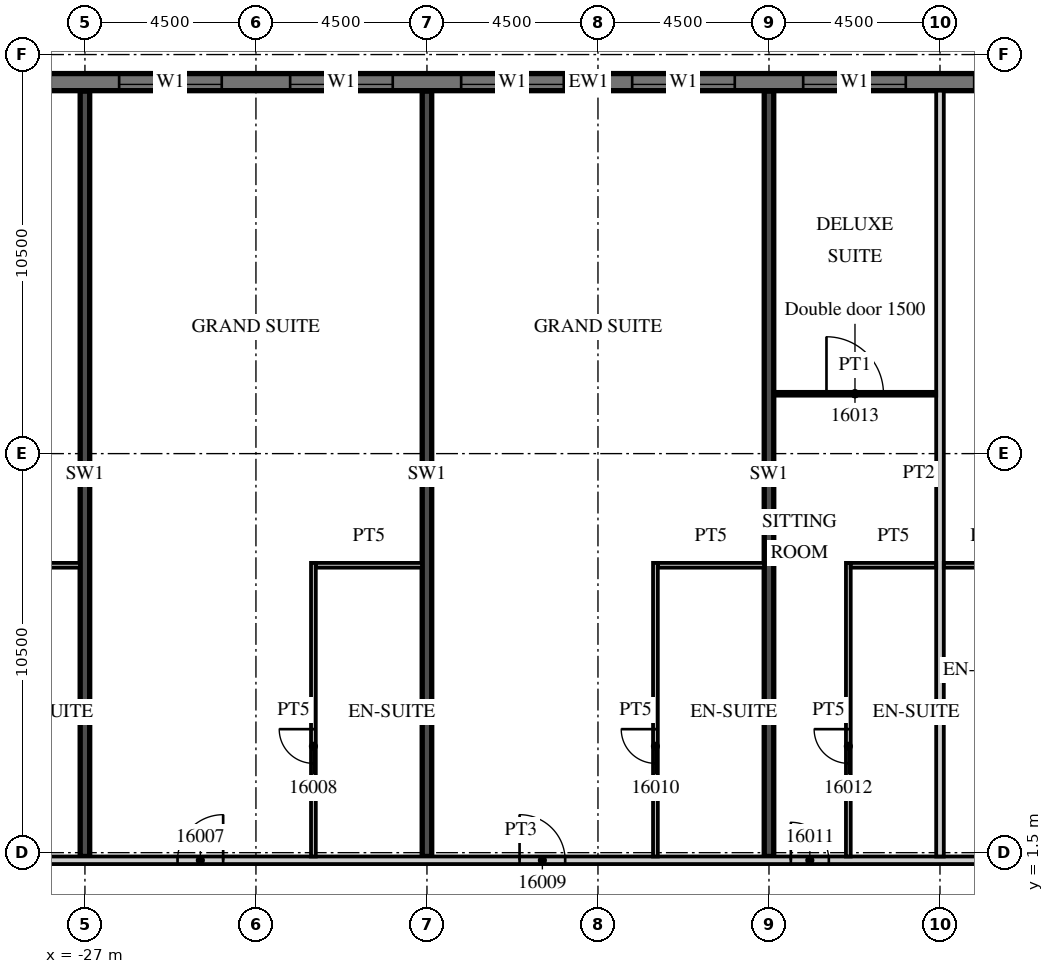
"""IFC4 building model, lengths in metres.
Left out: names, types, materials, properties, quantities, classifications, styles, units other than length and angle.
Written with IfcOpenShell. Run it as: python <this file> out.ifc"""

import sys

from ifc_helpers import new_model, si_unit, direction, frame, frame_2d, origin, place, context, subcontext, project, spatial, rectangle, extrude, element, fill, save


model = new_model("IFC4")
c1 = context("Model", 3, precision=1e-05, world=origin(), true_north=direction((0.0, 1.0)))
c2 = subcontext(c1, "Body", "Model", "MODEL_VIEW")
j1 = project(units=[si_unit("LENGTHUNIT", "METRE"), si_unit("PLANEANGLEUNIT", "RADIAN")], contexts=[c1])
p1 = place(None, origin())
s1 = spatial("IfcSite", under=j1, at=p1, CompositionType="ELEMENT")
p2 = place(p1, origin())
s2 = spatial("IfcBuilding", under=s1, at=p2, CompositionType="ELEMENT")
p3 = place(p2, frame((0.0, 0.0, 83.1)))
s3 = spatial("IfcBuildingStorey", under=s2, at=p3, CompositionType="ELEMENT", Elevation=83.1)
for number, where, z_axis, x_axis in (
    (1, (-27.0, 1.4, 0.0), (0.0, 0.0, 1.0), (0.0, 1.0, 0.0)),
    (2, (-18.0, 1.4, 0.0), (0.0, 0.0, 1.0), (0.0, 1.0, 0.0)),
    (3, (-9.0, 1.4, 0.0), (0.0, 0.0, 1.0), (0.0, 1.0, 0.0)),
):
    element("IfcWall", number, at=place(p3, frame(where, z_axis=z_axis, x_axis=x_axis)), inside=s3, PredefinedType="SHEAR", context=c2, shape_type="SweptSolid", body=[
        extrude(rectangle(XDim=20.14, YDim=0.25, at=frame_2d((10.07, 0.0))), origin(), (0.0, 0.0, 1.0), 3.3),
    ])
p4 = place(p3, frame((13.5, 21.775, 0.0), z_axis=(0.0, 0.0, 1.0), x_axis=(-1.0, 0.0, 0.0)))
e4 = element("IfcWall", 4, at=p4, inside=s3, PredefinedType="SOLIDWALL", context=c2, shape_type="SweptSolid", body=[
    extrude(rectangle(XDim=54.5, YDim=0.45, at=frame_2d((27.25, 0.0))), origin(), (0.0, 0.0, 1.0), 3.02),
])
p5 = place(p4, frame((0.9, 0.0, 0.45)))
e5 = element("IfcOpeningElement", 5, at=p5, cuts=e4, PredefinedType="OPENING", context=c2, shape_type="SweptSolid", body=[
    extrude(rectangle(XDim=2.7, YDim=2.25, at=frame_2d((1.35, 1.125))), frame((0.0, 0.235, 0.0), z_axis=(0.0, -1.0, 0.0), x_axis=(1.0, 0.0, 0.0)), (0.0, 0.0, 1.0), 0.47),
])
p6 = place(p4, frame((5.4, 0.0, 0.45)))
e6 = element("IfcOpeningElement", 6, at=p6, cuts=e4, PredefinedType="OPENING", context=c2, shape_type="SweptSolid", body=[
    extrude(rectangle(XDim=2.7, YDim=2.25, at=frame_2d((1.35, 1.125))), frame((0.0, 0.235, 0.0), z_axis=(0.0, -1.0, 0.0), x_axis=(1.0, 0.0, 0.0)), (0.0, 0.0, 1.0), 0.47),
])
p7 = place(p4, frame((9.9, 0.0, 0.45)))
e7 = element("IfcOpeningElement", 7, at=p7, cuts=e4, PredefinedType="OPENING", context=c2, shape_type="SweptSolid", body=[
    extrude(rectangle(XDim=2.7, YDim=2.25, at=frame_2d((1.35, 1.125))), frame((0.0, 0.235, 0.0), z_axis=(0.0, -1.0, 0.0), x_axis=(1.0, 0.0, 0.0)), (0.0, 0.0, 1.0), 0.47),
])
p8 = place(p4, frame((14.4, 0.0, 0.45)))
e8 = element("IfcOpeningElement", 8, at=p8, cuts=e4, PredefinedType="OPENING", context=c2, shape_type="SweptSolid", body=[
    extrude(rectangle(XDim=2.7, YDim=2.25, at=frame_2d((1.35, 1.125))), frame((0.0, 0.235, 0.0), z_axis=(0.0, -1.0, 0.0), x_axis=(1.0, 0.0, 0.0)), (0.0, 0.0, 1.0), 0.47),
])
p9 = place(p4, frame((18.9, 0.0, 0.45)))
e9 = element("IfcOpeningElement", 9, at=p9, cuts=e4, PredefinedType="OPENING", context=c2, shape_type="SweptSolid", body=[
    extrude(rectangle(XDim=2.7, YDim=2.25, at=frame_2d((1.35, 1.125))), frame((0.0, 0.235, 0.0), z_axis=(0.0, -1.0, 0.0), x_axis=(1.0, 0.0, 0.0)), (0.0, 0.0, 1.0), 0.47),
])
p10 = place(p4, frame((23.4, 0.0, 0.45)))
e10 = element("IfcOpeningElement", 10, at=p10, cuts=e4, PredefinedType="OPENING", context=c2, shape_type="SweptSolid", body=[
    extrude(rectangle(XDim=2.7, YDim=2.25, at=frame_2d((1.35, 1.125))), frame((0.0, 0.235, 0.0), z_axis=(0.0, -1.0, 0.0), x_axis=(1.0, 0.0, 0.0)), (0.0, 0.0, 1.0), 0.47),
])
p11 = place(p4, frame((27.9, 0.0, 0.45)))
e11 = element("IfcOpeningElement", 11, at=p11, cuts=e4, PredefinedType="OPENING", context=c2, shape_type="SweptSolid", body=[
    extrude(rectangle(XDim=2.7, YDim=2.25, at=frame_2d((1.35, 1.125))), frame((0.0, 0.235, 0.0), z_axis=(0.0, -1.0, 0.0), x_axis=(1.0, 0.0, 0.0)), (0.0, 0.0, 1.0), 0.47),
])
p12 = place(p4, frame((32.4, 0.0, 0.45)))
e12 = element("IfcOpeningElement", 12, at=p12, cuts=e4, PredefinedType="OPENING", context=c2, shape_type="SweptSolid", body=[
    extrude(rectangle(XDim=2.7, YDim=2.25, at=frame_2d((1.35, 1.125))), frame((0.0, 0.235, 0.0), z_axis=(0.0, -1.0, 0.0), x_axis=(1.0, 0.0, 0.0)), (0.0, 0.0, 1.0), 0.47),
])
p13 = place(p4, frame((36.9, 0.0, 0.45)))
e13 = element("IfcOpeningElement", 13, at=p13, cuts=e4, PredefinedType="OPENING", context=c2, shape_type="SweptSolid", body=[
    extrude(rectangle(XDim=2.7, YDim=2.25, at=frame_2d((1.35, 1.125))), frame((0.0, 0.235, 0.0), z_axis=(0.0, -1.0, 0.0), x_axis=(1.0, 0.0, 0.0)), (0.0, 0.0, 1.0), 0.47),
])
p14 = place(p4, frame((41.4, 0.0, 0.45)))
e14 = element("IfcOpeningElement", 14, at=p14, cuts=e4, PredefinedType="OPENING", context=c2, shape_type="SweptSolid", body=[
    extrude(rectangle(XDim=2.7, YDim=2.25, at=frame_2d((1.35, 1.125))), frame((0.0, 0.235, 0.0), z_axis=(0.0, -1.0, 0.0), x_axis=(1.0, 0.0, 0.0)), (0.0, 0.0, 1.0), 0.47),
])
p15 = place(p4, frame((45.9, 0.0, 0.45)))
e15 = element("IfcOpeningElement", 15, at=p15, cuts=e4, PredefinedType="OPENING", context=c2, shape_type="SweptSolid", body=[
    extrude(rectangle(XDim=2.7, YDim=2.25, at=frame_2d((1.35, 1.125))), frame((0.0, 0.235, 0.0), z_axis=(0.0, -1.0, 0.0), x_axis=(1.0, 0.0, 0.0)), (0.0, 0.0, 1.0), 0.47),
])
p16 = place(p4, frame((50.4, 0.0, 0.45)))
e16 = element("IfcOpeningElement", 16, at=p16, cuts=e4, PredefinedType="OPENING", context=c2, shape_type="SweptSolid", body=[
    extrude(rectangle(XDim=2.7, YDim=2.25, at=frame_2d((1.35, 1.125))), frame((0.0, 0.235, 0.0), z_axis=(0.0, -1.0, 0.0), x_axis=(1.0, 0.0, 0.0)), (0.0, 0.0, 1.0), 0.47),
])
p17 = place(p3, frame((-44.55, 1.3, 0.0), z_axis=(0.0, 0.0, 1.0), x_axis=(1.0, 0.0, 0.0)))
e17 = element("IfcWall", 17, at=p17, inside=s3, PredefinedType="PARTITIONING", context=c2, shape_type="SweptSolid", body=[
    extrude(rectangle(XDim=58.05, YDim=0.2, at=frame_2d((29.025, 0.0))), origin(), (0.0, 0.0, 1.0), 3.02),
])
p18 = place(p17, frame((0.525, 0.0, 0.0)))
e18 = element("IfcOpeningElement", 18, at=p18, cuts=e17, PredefinedType="OPENING", context=c2, shape_type="SweptSolid", body=[
    extrude(rectangle(XDim=1.0, YDim=2.1, at=frame_2d((0.5, 1.05))), frame((0.0, 0.11, 0.0), z_axis=(0.0, -1.0, 0.0), x_axis=(1.0, 0.0, 0.0)), (0.0, 0.0, 1.0), 0.22),
])
p19 = place(p17, frame((4.625, 0.0, 0.0)))
e19 = element("IfcOpeningElement", 19, at=p19, cuts=e17, PredefinedType="OPENING", context=c2, shape_type="SweptSolid", body=[
    extrude(rectangle(XDim=1.0, YDim=2.1, at=frame_2d((0.5, 1.05))), frame((0.0, 0.11, 0.0), z_axis=(0.0, -1.0, 0.0), x_axis=(1.0, 0.0, 0.0)), (0.0, 0.0, 1.0), 0.22),
])
p20 = place(p17, frame((10.987, 0.0, 0.0)))
e20 = element("IfcOpeningElement", 20, at=p20, cuts=e17, PredefinedType="OPENING", context=c2, shape_type="SweptSolid", body=[
    extrude(rectangle(XDim=1.2, YDim=2.1, at=frame_2d((0.6, 1.05))), frame((0.0, 0.11, 0.0), z_axis=(0.0, -1.0, 0.0), x_axis=(1.0, 0.0, 0.0)), (0.0, 0.0, 1.0), 0.22),
])
p21 = place(p17, frame((19.987, 0.0, 0.0)))
e21 = element("IfcOpeningElement", 21, at=p21, cuts=e17, PredefinedType="OPENING", context=c2, shape_type="SweptSolid", body=[
    extrude(rectangle(XDim=1.2, YDim=2.1, at=frame_2d((0.6, 1.05))), frame((0.0, 0.11, 0.0), z_axis=(0.0, -1.0, 0.0), x_axis=(1.0, 0.0, 0.0)), (0.0, 0.0, 1.0), 0.22),
])
p22 = place(p17, frame((28.987, 0.0, 0.0)))
e22 = element("IfcOpeningElement", 22, at=p22, cuts=e17, PredefinedType="OPENING", context=c2, shape_type="SweptSolid", body=[
    extrude(rectangle(XDim=1.2, YDim=2.1, at=frame_2d((0.6, 1.05))), frame((0.0, 0.11, 0.0), z_axis=(0.0, -1.0, 0.0), x_axis=(1.0, 0.0, 0.0)), (0.0, 0.0, 1.0), 0.22),
])
p23 = place(p17, frame((36.125, 0.0, 0.0)))
e23 = element("IfcOpeningElement", 23, at=p23, cuts=e17, PredefinedType="OPENING", context=c2, shape_type="SweptSolid", body=[
    extrude(rectangle(XDim=1.0, YDim=2.1, at=frame_2d((0.5, 1.05))), frame((0.0, 0.11, 0.0), z_axis=(0.0, -1.0, 0.0), x_axis=(1.0, 0.0, 0.0)), (0.0, 0.0, 1.0), 0.22),
])
p24 = place(p17, frame((42.975, 0.0, 0.0)))
e24 = element("IfcOpeningElement", 24, at=p24, cuts=e17, PredefinedType="OPENING", context=c2, shape_type="SweptSolid", body=[
    extrude(rectangle(XDim=1.0, YDim=2.1, at=frame_2d((0.5, 1.05))), frame((0.0, 0.11, 0.0), z_axis=(0.0, -1.0, 0.0), x_axis=(1.0, 0.0, 0.0)), (0.0, 0.0, 1.0), 0.22),
])
p25 = place(p17, frame((46.987, 0.0, 0.0)))
e25 = element("IfcOpeningElement", 25, at=p25, cuts=e17, PredefinedType="OPENING", context=c2, shape_type="SweptSolid", body=[
    extrude(rectangle(XDim=1.2, YDim=2.1, at=frame_2d((0.6, 1.05))), frame((0.0, 0.11, 0.0), z_axis=(0.0, -1.0, 0.0), x_axis=(1.0, 0.0, 0.0)), (0.0, 0.0, 1.0), 0.22),
])
p26 = place(p17, frame((56.475, 0.0, 0.0)))
e26 = element("IfcOpeningElement", 26, at=p26, cuts=e17, PredefinedType="OPENING", context=c2, shape_type="SweptSolid", body=[
    extrude(rectangle(XDim=1.0, YDim=2.1, at=frame_2d((0.5, 1.05))), frame((0.0, 0.11, 0.0), z_axis=(0.0, -1.0, 0.0), x_axis=(1.0, 0.0, 0.0)), (0.0, 0.0, 1.0), 0.22),
])
p27 = place(p3, frame((-29.925, 9.062, 0.0), z_axis=(0.0, 0.0, 1.0), x_axis=(1.0, 0.0, 0.0)))
e27 = element("IfcWall", 27, at=p27, inside=s3, PredefinedType="PARTITIONING", context=c2, shape_type="SweptSolid", body=[
    extrude(rectangle(XDim=2.8, YDim=0.125, at=frame_2d((1.4, 0.0))), origin(), (0.0, 0.0, 1.0), 3.02),
])
p28 = place(p3, frame((-20.988, 1.4, 0.0), z_axis=(0.0, 0.0, 1.0), x_axis=(0.0, 1.0, 0.0)))
e28 = element("IfcWall", 28, at=p28, inside=s3, PredefinedType="PARTITIONING", context=c2, shape_type="SweptSolid", body=[
    extrude(rectangle(XDim=7.725, YDim=0.125, at=frame_2d((3.863, 0.0))), origin(), (0.0, 0.0, 1.0), 3.02),
])
p29 = place(p28, frame((2.45, 0.0, 0.0)))
e29 = element("IfcOpeningElement", 29, at=p29, cuts=e28, PredefinedType="OPENING", context=c2, shape_type="SweptSolid", body=[
    extrude(rectangle(XDim=0.9, YDim=2.1, at=frame_2d((0.45, 1.05))), frame((0.0, 0.073, 0.0), z_axis=(0.0, -1.0, 0.0), x_axis=(1.0, 0.0, 0.0)), (0.0, 0.0, 1.0), 0.145),
])
p30 = place(p3, frame((-20.925, 9.062, 0.0), z_axis=(0.0, 0.0, 1.0), x_axis=(1.0, 0.0, 0.0)))
e30 = element("IfcWall", 30, at=p30, inside=s3, PredefinedType="PARTITIONING", context=c2, shape_type="SweptSolid", body=[
    extrude(rectangle(XDim=2.8, YDim=0.125, at=frame_2d((1.4, 0.0))), origin(), (0.0, 0.0, 1.0), 3.02),
])
p31 = place(p3, frame((-11.988, 1.4, 0.0), z_axis=(0.0, 0.0, 1.0), x_axis=(0.0, 1.0, 0.0)))
e31 = element("IfcWall", 31, at=p31, inside=s3, PredefinedType="PARTITIONING", context=c2, shape_type="SweptSolid", body=[
    extrude(rectangle(XDim=7.725, YDim=0.125, at=frame_2d((3.863, 0.0))), origin(), (0.0, 0.0, 1.0), 3.02),
])
p32 = place(p31, frame((2.45, 0.0, 0.0)))
e32 = element("IfcOpeningElement", 32, at=p32, cuts=e31, PredefinedType="OPENING", context=c2, shape_type="SweptSolid", body=[
    extrude(rectangle(XDim=0.9, YDim=2.1, at=frame_2d((0.45, 1.05))), frame((0.0, 0.073, 0.0), z_axis=(0.0, -1.0, 0.0), x_axis=(1.0, 0.0, 0.0)), (0.0, 0.0, 1.0), 0.145),
])
p33 = place(p3, frame((-11.925, 9.062, 0.0), z_axis=(0.0, 0.0, 1.0), x_axis=(1.0, 0.0, 0.0)))
e33 = element("IfcWall", 33, at=p33, inside=s3, PredefinedType="PARTITIONING", context=c2, shape_type="SweptSolid", body=[
    extrude(rectangle(XDim=2.8, YDim=0.125, at=frame_2d((1.4, 0.0))), origin(), (0.0, 0.0, 1.0), 3.02),
])
p34 = place(p3, frame((-4.5, 1.4, 0.0), z_axis=(0.0, 0.0, 1.0), x_axis=(0.0, 1.0, 0.0)))
e34 = element("IfcWall", 34, at=p34, inside=s3, PredefinedType="PARTITIONING", context=c2, shape_type="SweptSolid", body=[
    extrude(rectangle(XDim=20.15, YDim=0.2, at=frame_2d((10.075, 0.0))), origin(), (0.0, 0.0, 1.0), 3.02),
])
p35 = place(p3, frame((-6.912, 1.4, 0.0), z_axis=(0.0, 0.0, 1.0), x_axis=(0.0, 1.0, 0.0)))
e35 = element("IfcWall", 35, at=p35, inside=s3, PredefinedType="PARTITIONING", context=c2, shape_type="SweptSolid", body=[
    extrude(rectangle(XDim=7.725, YDim=0.125, at=frame_2d((3.863, 0.0))), origin(), (0.0, 0.0, 1.0), 3.02),
])
p36 = place(p35, frame((2.45, 0.0, 0.0)))
e36 = element("IfcOpeningElement", 36, at=p36, cuts=e35, PredefinedType="OPENING", context=c2, shape_type="SweptSolid", body=[
    extrude(rectangle(XDim=0.9, YDim=2.1, at=frame_2d((0.45, 1.05))), frame((0.0, 0.073, 0.0), z_axis=(0.0, -1.0, 0.0), x_axis=(1.0, 0.0, 0.0)), (0.0, 0.0, 1.0), 0.145),
])
p37 = place(p3, frame((-6.85, 9.062, 0.0), z_axis=(0.0, 0.0, 1.0), x_axis=(1.0, 0.0, 0.0)))
e37 = element("IfcWall", 37, at=p37, inside=s3, PredefinedType="PARTITIONING", context=c2, shape_type="SweptSolid", body=[
    extrude(rectangle(XDim=2.25, YDim=0.125, at=frame_2d((1.125, 0.0))), origin(), (0.0, 0.0, 1.0), 3.02),
])
p38 = place(p3, frame((-8.875, 13.575, 0.0), z_axis=(0.0, 0.0, 1.0), x_axis=(1.0, 0.0, 0.0)))
e38 = element("IfcWall", 38, at=p38, inside=s3, PredefinedType="PARTITIONING", context=c2, shape_type="SweptSolid", body=[
    extrude(rectangle(XDim=4.275, YDim=0.1, at=frame_2d((2.137, 0.0))), origin(), (0.0, 0.0, 1.0), 3.02),
])
p39 = place(p38, frame((1.388, 0.0, 0.0)))
e39 = element("IfcOpeningElement", 39, at=p39, cuts=e38, PredefinedType="OPENING", context=c2, shape_type="SweptSolid", body=[
    extrude(rectangle(XDim=1.5, YDim=2.1, at=frame_2d((0.75, 1.05))), frame((0.0, 0.06, 0.0), z_axis=(0.0, -1.0, 0.0), x_axis=(1.0, 0.0, 0.0)), (0.0, 0.0, 1.0), 0.12),
])
p40 = place(p3, frame((-4.4, 9.062, 0.0), z_axis=(0.0, 0.0, 1.0), x_axis=(1.0, 0.0, 0.0)))
e40 = element("IfcWall", 40, at=p40, inside=s3, PredefinedType="PARTITIONING", context=c2, shape_type="SweptSolid", body=[
    extrude(rectangle(XDim=2.25, YDim=0.125, at=frame_2d((1.125, 0.0))), origin(), (0.0, 0.0, 1.0), 3.02),
])
p41 = place(p9, origin())
e41 = element("IfcWindow", 41, at=p41, inside=s3, PartitioningType="SINGLE_PANEL", PredefinedType="WINDOW", context=c2, shape_type="SweptSolid", body=[
    extrude(rectangle(XDim=2.7, YDim=2.25, at=frame_2d((1.35, 1.125))), frame((0.0, 0.09, 0.0), z_axis=(0.0, -1.0, 0.0), x_axis=(1.0, 0.0, 0.0)), (0.0, 0.0, 1.0), 0.06),
])
fill(e9, e41)
p42 = place(p10, origin())
e42 = element("IfcWindow", 42, at=p42, inside=s3, PartitioningType="SINGLE_PANEL", PredefinedType="WINDOW", context=c2, shape_type="SweptSolid", body=[
    extrude(rectangle(XDim=2.7, YDim=2.25, at=frame_2d((1.35, 1.125))), frame((0.0, 0.09, 0.0), z_axis=(0.0, -1.0, 0.0), x_axis=(1.0, 0.0, 0.0)), (0.0, 0.0, 1.0), 0.06),
])
fill(e10, e42)
p43 = place(p11, origin())
e43 = element("IfcWindow", 43, at=p43, inside=s3, PartitioningType="SINGLE_PANEL", PredefinedType="WINDOW", context=c2, shape_type="SweptSolid", body=[
    extrude(rectangle(XDim=2.7, YDim=2.25, at=frame_2d((1.35, 1.125))), frame((0.0, 0.09, 0.0), z_axis=(0.0, -1.0, 0.0), x_axis=(1.0, 0.0, 0.0)), (0.0, 0.0, 1.0), 0.06),
])
fill(e11, e43)
p44 = place(p12, origin())
e44 = element("IfcWindow", 44, at=p44, inside=s3, PartitioningType="SINGLE_PANEL", PredefinedType="WINDOW", context=c2, shape_type="SweptSolid", body=[
    extrude(rectangle(XDim=2.7, YDim=2.25, at=frame_2d((1.35, 1.125))), frame((0.0, 0.09, 0.0), z_axis=(0.0, -1.0, 0.0), x_axis=(1.0, 0.0, 0.0)), (0.0, 0.0, 1.0), 0.06),
])
fill(e12, e44)
p45 = place(p13, origin())
e45 = element("IfcWindow", 45, at=p45, inside=s3, PartitioningType="SINGLE_PANEL", PredefinedType="WINDOW", context=c2, shape_type="SweptSolid", body=[
    extrude(rectangle(XDim=2.7, YDim=2.25, at=frame_2d((1.35, 1.125))), frame((0.0, 0.09, 0.0), z_axis=(0.0, -1.0, 0.0), x_axis=(1.0, 0.0, 0.0)), (0.0, 0.0, 1.0), 0.06),
])
fill(e13, e45)
p46 = place(p21, origin())
e46 = element("IfcDoor", 46, at=p46, inside=s3, OperationType="SINGLE_SWING_RIGHT", PredefinedType="DOOR", context=c2, shape_type="SweptSolid", body=[
    extrude(rectangle(XDim=1.2, YDim=2.1, at=frame_2d((0.6, 1.05))), frame((0.0, 0.025, 0.0), z_axis=(0.0, -1.0, 0.0), x_axis=(1.0, 0.0, 0.0)), (0.0, 0.0, 1.0), 0.05),
])
fill(e21, e46)
p47 = place(p29, origin())
e47 = element("IfcDoor", 47, at=p47, inside=s3, OperationType="SINGLE_SWING_RIGHT", PredefinedType="DOOR", context=c2, shape_type="SweptSolid", body=[
    extrude(rectangle(XDim=0.9, YDim=2.1, at=frame_2d((0.45, 1.05))), frame((0.0, 0.025, 0.0), z_axis=(0.0, -1.0, 0.0), x_axis=(1.0, 0.0, 0.0)), (0.0, 0.0, 1.0), 0.05),
])
fill(e29, e47)
p48 = place(p22, origin())
e48 = element("IfcDoor", 48, at=p48, inside=s3, OperationType="SINGLE_SWING_LEFT", PredefinedType="DOOR", context=c2, shape_type="SweptSolid", body=[
    extrude(rectangle(XDim=1.2, YDim=2.1, at=frame_2d((0.6, 1.05))), frame((0.0, 0.025, 0.0), z_axis=(0.0, -1.0, 0.0), x_axis=(1.0, 0.0, 0.0)), (0.0, 0.0, 1.0), 0.05),
])
fill(e22, e48)
p49 = place(p32, origin())
e49 = element("IfcDoor", 49, at=p49, inside=s3, OperationType="SINGLE_SWING_RIGHT", PredefinedType="DOOR", context=c2, shape_type="SweptSolid", body=[
    extrude(rectangle(XDim=0.9, YDim=2.1, at=frame_2d((0.45, 1.05))), frame((0.0, 0.025, 0.0), z_axis=(0.0, -1.0, 0.0), x_axis=(1.0, 0.0, 0.0)), (0.0, 0.0, 1.0), 0.05),
])
fill(e32, e49)
p50 = place(p23, origin())
e50 = element("IfcDoor", 50, at=p50, inside=s3, OperationType="SINGLE_SWING_LEFT", PredefinedType="DOOR", context=c2, shape_type="SweptSolid", body=[
    extrude(rectangle(XDim=1.0, YDim=2.1, at=frame_2d((0.5, 1.05))), frame((0.0, 0.025, 0.0), z_axis=(0.0, -1.0, 0.0), x_axis=(1.0, 0.0, 0.0)), (0.0, 0.0, 1.0), 0.05),
])
fill(e23, e50)
p51 = place(p36, origin())
e51 = element("IfcDoor", 51, at=p51, inside=s3, OperationType="SINGLE_SWING_RIGHT", PredefinedType="DOOR", context=c2, shape_type="SweptSolid", body=[
    extrude(rectangle(XDim=0.9, YDim=2.1, at=frame_2d((0.45, 1.05))), frame((0.0, 0.025, 0.0), z_axis=(0.0, -1.0, 0.0), x_axis=(1.0, 0.0, 0.0)), (0.0, 0.0, 1.0), 0.05),
])
fill(e36, e51)
p52 = place(p39, origin())
e52 = element("IfcDoor", 52, at=p52, inside=s3, OperationType="SINGLE_SWING_LEFT", PredefinedType="DOOR", context=c2, shape_type="SweptSolid", body=[
    extrude(rectangle(XDim=1.5, YDim=2.1, at=frame_2d((0.75, 1.05))), frame((0.0, 0.025, 0.0), z_axis=(0.0, -1.0, 0.0), x_axis=(1.0, 0.0, 0.0)), (0.0, 0.0, 1.0), 0.05),
])
fill(e39, e52)
save(model, sys.argv[1])
